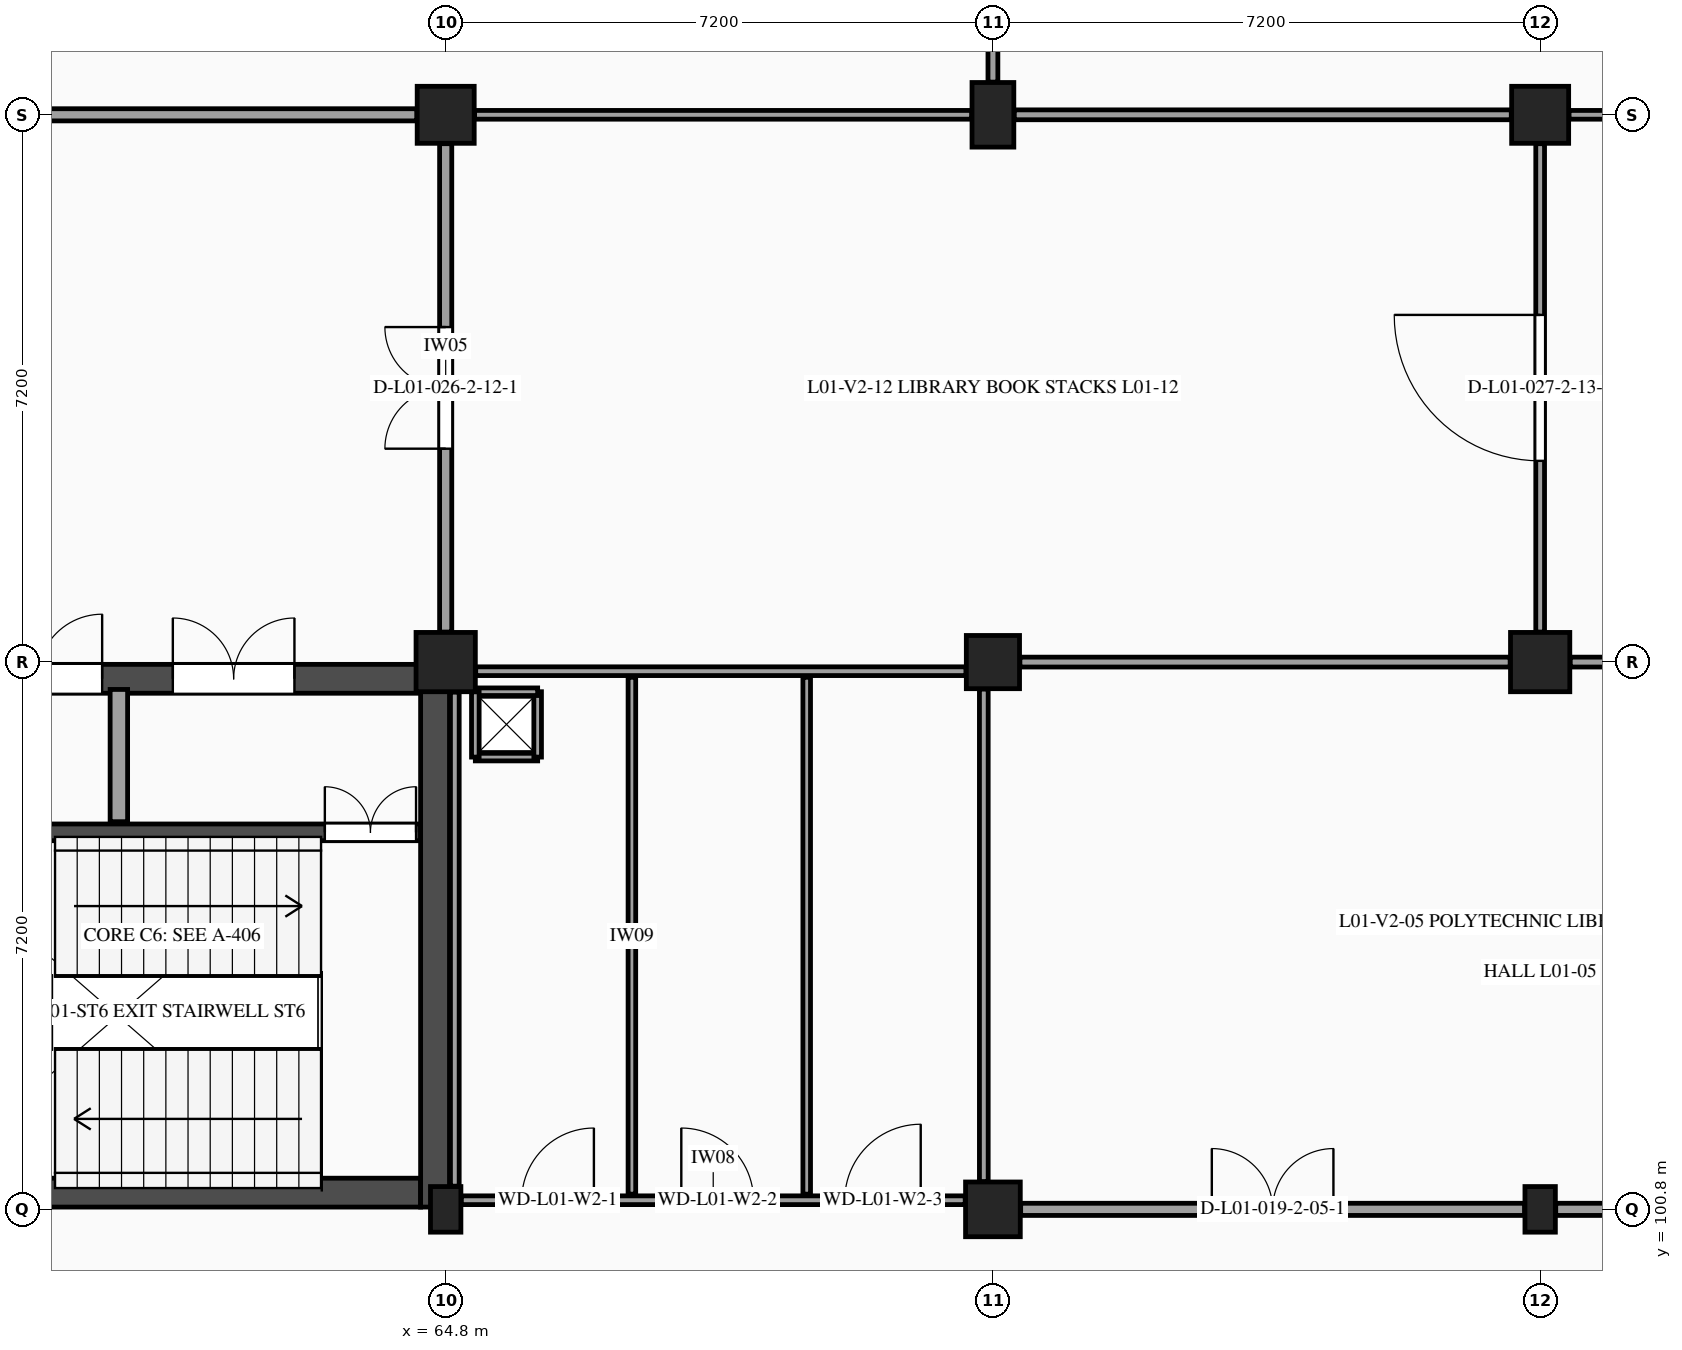
"""IFC4 building model, lengths in metres.
Left out: names, types, materials, properties, quantities, classifications, styles, units other than length and angle.
Written with IfcOpenShell. Run it as: python <this file> out.ifc"""

import sys

from ifc_helpers import new_model, si_unit, direction, frame, frame_2d, origin, origin_2d, place, context, subcontext, project, spatial, rectangle, extrude, element, fill, save


model = new_model("IFC4")
c1 = context("Model", 3, precision=1e-05, world=origin(), true_north=direction((0.0, 1.0)))
c2 = subcontext(c1, "Body", "Model", "MODEL_VIEW")
j1 = project(units=[si_unit("LENGTHUNIT", "METRE"), si_unit("PLANEANGLEUNIT", "RADIAN")], contexts=[c1])
p1 = place(None, origin())
s1 = spatial("IfcSite", under=j1, at=p1, CompositionType="ELEMENT")
p2 = place(p1, origin())
s2 = spatial("IfcBuilding", under=s1, at=p2, CompositionType="ELEMENT")
p3 = place(p2, frame((0.0, 0.0, 5.4)))
s3 = spatial("IfcBuildingStorey", under=s2, at=p3, CompositionType="ELEMENT", Elevation=5.4)
p4 = place(p3, frame((64.8, 100.8, 0.0), z_axis=(0.0, 0.0, 1.0), x_axis=(1.0, 0.0, 0.0)))
e1 = element("IfcColumn", 1, at=p4, inside=s3, PredefinedType="PILASTER", context=c2, shape_type="SweptSolid", body=[
    extrude(rectangle(XDim=0.4, YDim=0.6, at=origin_2d()), origin(), (0.0, 0.0, 1.0), 4.5),
])
p5 = place(p3, frame((64.8, 108.0, 0.0), z_axis=(0.0, 0.0, 1.0), x_axis=(1.0, 0.0, 0.0)))
e2 = element("IfcColumn", 2, at=p5, inside=s3, PredefinedType="COLUMN", context=c2, shape_type="SweptSolid", body=[
    extrude(rectangle(XDim=0.78, YDim=0.78, at=origin_2d()), origin(), (0.0, 0.0, 1.0), 4.5),
])
p6 = place(p3, frame((64.8, 115.2, 0.0), z_axis=(0.0, 0.0, 1.0), x_axis=(1.0, 0.0, 0.0)))
e3 = element("IfcColumn", 3, at=p6, inside=s3, PredefinedType="COLUMN", context=c2, shape_type="SweptSolid", body=[
    extrude(rectangle(XDim=0.75, YDim=0.75, at=origin_2d()), origin(), (0.0, 0.0, 1.0), 4.5),
])
p7 = place(p3, frame((72.0, 100.8, 0.0), z_axis=(0.0, 0.0, 1.0), x_axis=(1.0, 0.0, 0.0)))
e4 = element("IfcColumn", 4, at=p7, inside=s3, PredefinedType="COLUMN", context=c2, shape_type="SweptSolid", body=[
    extrude(rectangle(XDim=0.72, YDim=0.72, at=origin_2d()), origin(), (0.0, 0.0, 1.0), 4.5),
])
p8 = place(p3, frame((72.0, 108.0, 0.0), z_axis=(0.0, 0.0, 1.0), x_axis=(1.0, 0.0, 0.0)))
e5 = element("IfcColumn", 5, at=p8, inside=s3, PredefinedType="COLUMN", context=c2, shape_type="SweptSolid", body=[
    extrude(rectangle(XDim=0.7, YDim=0.7, at=origin_2d()), origin(), (0.0, 0.0, 1.0), 4.5),
])
p9 = place(p3, frame((72.0, 115.2, 0.0), z_axis=(0.0, 0.0, 1.0), x_axis=(1.0, 0.0, 0.0)))
e6 = element("IfcColumn", 6, at=p9, inside=s3, PredefinedType="COLUMN", context=c2, shape_type="SweptSolid", body=[
    extrude(rectangle(XDim=0.55, YDim=0.85, at=origin_2d()), origin(), (0.0, 0.0, 1.0), 4.5),
])
p10 = place(p3, frame((79.2, 100.8, 0.0), z_axis=(0.0, 0.0, 1.0), x_axis=(1.0, 0.0, 0.0)))
e7 = element("IfcColumn", 7, at=p10, inside=s3, PredefinedType="PILASTER", context=c2, shape_type="SweptSolid", body=[
    extrude(rectangle(XDim=0.4, YDim=0.6, at=origin_2d()), origin(), (0.0, 0.0, 1.0), 4.5),
])
p11 = place(p3, frame((79.2, 108.0, 0.0), z_axis=(0.0, 0.0, 1.0), x_axis=(1.0, 0.0, 0.0)))
e8 = element("IfcColumn", 8, at=p11, inside=s3, PredefinedType="COLUMN", context=c2, shape_type="SweptSolid", body=[
    extrude(rectangle(XDim=0.78, YDim=0.78, at=origin_2d()), origin(), (0.0, 0.0, 1.0), 4.5),
])
p12 = place(p3, frame((79.2, 115.2, 0.0), z_axis=(0.0, 0.0, 1.0), x_axis=(1.0, 0.0, 0.0)))
e9 = element("IfcColumn", 9, at=p12, inside=s3, PredefinedType="COLUMN", context=c2, shape_type="SweptSolid", body=[
    extrude(rectangle(XDim=0.75, YDim=0.75, at=origin_2d()), origin(), (0.0, 0.0, 1.0), 4.5),
])
p13 = place(p3, frame((58.01, 101.02, 0.0), z_axis=(0.0, 0.0, 1.0), x_axis=(1.0, 0.0, 0.0)))
e10 = element("IfcWall", 10, at=p13, inside=s3, PredefinedType="SHEAR", context=c2, shape_type="SweptSolid", body=[
    extrude(rectangle(XDim=6.46, YDim=0.38, at=frame_2d((3.23, 0.0))), origin(), (0.0, 0.0, 1.0), 4.21),
])
p14 = place(p3, frame((58.01, 107.78, 0.0), z_axis=(0.0, 0.0, 1.0), x_axis=(1.0, 0.0, 0.0)))
e11 = element("IfcWall", 11, at=p14, inside=s3, PredefinedType="SHEAR", context=c2, shape_type="SweptSolid", body=[
    extrude(rectangle(XDim=6.46, YDim=0.38, at=frame_2d((3.23, 0.0))), origin(), (0.0, 0.0, 1.0), 4.21),
])
p15 = place(p14, frame((1.42, 0.0, 0.0)))
e12 = element("IfcOpeningElement", 12, at=p15, cuts=e11, PredefinedType="OPENING", context=c2, shape_type="SweptSolid", body=[
    extrude(rectangle(XDim=0.85, YDim=2.1, at=frame_2d((0.425, 1.05))), frame((0.0, 0.2, 0.0), z_axis=(0.0, -1.0, 0.0), x_axis=(1.0, 0.0, 0.0)), (0.0, 0.0, 1.0), 0.4),
])
p16 = place(p14, frame((3.2, 0.0, 0.0)))
e13 = element("IfcOpeningElement", 13, at=p16, cuts=e11, PredefinedType="OPENING", context=c2, shape_type="SweptSolid", body=[
    extrude(rectangle(XDim=1.6, YDim=2.2, at=frame_2d((0.8, 1.1))), frame((0.0, 0.2, 0.0), z_axis=(0.0, -1.0, 0.0), x_axis=(1.0, 0.0, 0.0)), (0.0, 0.0, 1.0), 0.4),
])
p17 = place(p3, frame((58.01, 105.76, 0.0), z_axis=(0.0, 0.0, 1.0), x_axis=(1.0, 0.0, 0.0)))
e14 = element("IfcWall", 14, at=p17, inside=s3, PredefinedType="SHEAR", context=c2, shape_type="SweptSolid", body=[
    extrude(rectangle(XDim=6.46, YDim=0.22, at=frame_2d((3.23, 0.0))), origin(), (0.0, 0.0, 1.0), 4.21),
])
p18 = place(p17, frame((5.2, 0.0, 0.0)))
e15 = element("IfcOpeningElement", 15, at=p18, cuts=e14, PredefinedType="OPENING", context=c2, shape_type="SweptSolid", body=[
    extrude(rectangle(XDim=1.2, YDim=2.2, at=frame_2d((0.6, 1.1))), frame((0.0, 0.12, 0.0), z_axis=(0.0, -1.0, 0.0), x_axis=(1.0, 0.0, 0.0)), (0.0, 0.0, 1.0), 0.24),
])
p19 = place(p3, frame((60.5, 105.9, 0.0), z_axis=(0.0, 0.0, 1.0), x_axis=(0.0, 1.0, 0.0)))
e16 = element("IfcWall", 16, at=p19, inside=s3, PredefinedType="PARTITIONING", context=c2, shape_type="SweptSolid", body=[
    extrude(rectangle(XDim=1.74, YDim=0.23, at=frame_2d((0.87, 0.0))), origin(), (0.0, 0.0, 1.0), 4.21),
])
p20 = place(p3, frame((64.66, 100.83, 0.0), z_axis=(0.0, 0.0, 1.0), x_axis=(0.0, 1.0, 0.0)))
e17 = element("IfcWall", 17, at=p20, inside=s3, PredefinedType="SHEAR", context=c2, shape_type="SweptSolid", body=[
    extrude(rectangle(XDim=7.14, YDim=0.38, at=frame_2d((3.57, 0.0))), origin(), (0.0, 0.0, 1.0), 4.21),
])
p21 = place(p3, frame((65.005, 100.92, 0.0), z_axis=(0.0, 0.0, 1.0), x_axis=(1.0, 0.0, 0.0)))
e18 = element("IfcWall", 18, at=p21, inside=s3, PredefinedType="PARTITIONING", context=c2, shape_type="SweptSolid", body=[
    extrude(rectangle(XDim=6.63, YDim=0.115, at=frame_2d((3.315, 0.0))), origin(), (0.0, 0.0, 1.0), 3.43),
])
p22 = place(p21, frame((0.795, 0.0, 0.0)))
e19 = element("IfcOpeningElement", 19, at=p22, cuts=e18, PredefinedType="OPENING", context=c2, shape_type="SweptSolid", body=[
    extrude(rectangle(XDim=0.95, YDim=2.1, at=frame_2d((0.475, 1.05))), frame((0.0, 0.067, 0.0), z_axis=(0.0, -1.0, 0.0), x_axis=(1.0, 0.0, 0.0)), (0.0, 0.0, 1.0), 0.135),
])
p23 = place(p21, frame((2.895, 0.0, 0.0)))
e20 = element("IfcOpeningElement", 20, at=p23, cuts=e18, PredefinedType="OPENING", context=c2, shape_type="SweptSolid", body=[
    extrude(rectangle(XDim=0.95, YDim=2.1, at=frame_2d((0.475, 1.05))), frame((0.0, 0.067, 0.0), z_axis=(0.0, -1.0, 0.0), x_axis=(1.0, 0.0, 0.0)), (0.0, 0.0, 1.0), 0.135),
])
p24 = place(p21, frame((5.045, 0.0, 0.0)))
e21 = element("IfcOpeningElement", 21, at=p24, cuts=e18, PredefinedType="OPENING", context=c2, shape_type="SweptSolid", body=[
    extrude(rectangle(XDim=1.0, YDim=2.15, at=frame_2d((0.5, 1.075))), frame((0.0, 0.067, 0.0), z_axis=(0.0, -1.0, 0.0), x_axis=(1.0, 0.0, 0.0)), (0.0, 0.0, 1.0), 0.135),
])
p25 = place(p3, frame((65.195, 107.88, 0.0), z_axis=(0.0, 0.0, 1.0), x_axis=(1.0, 0.0, 0.0)))
e22 = element("IfcWall", 22, at=p25, inside=s3, PredefinedType="PARTITIONING", context=c2, shape_type="SweptSolid", body=[
    extrude(rectangle(XDim=6.45, YDim=0.115, at=frame_2d((3.225, 0.0))), origin(), (0.0, 0.0, 1.0), 3.43),
])
p26 = place(p3, frame((64.92, 101.105, 0.0), z_axis=(0.0, 0.0, 1.0), x_axis=(0.0, 1.0, 0.0)))
e23 = element("IfcWall", 23, at=p26, inside=s3, PredefinedType="PARTITIONING", context=c2, shape_type="SweptSolid", body=[
    extrude(rectangle(XDim=6.5, YDim=0.115, at=frame_2d((3.25, 0.0))), origin(), (0.0, 0.0, 1.0), 3.525),
])
p27 = place(p3, frame((71.88, 101.165, 0.0), z_axis=(0.0, 0.0, 1.0), x_axis=(0.0, 1.0, 0.0)))
e24 = element("IfcWall", 24, at=p27, inside=s3, PredefinedType="PARTITIONING", context=c2, shape_type="SweptSolid", body=[
    extrude(rectangle(XDim=6.48, YDim=0.115, at=frame_2d((3.24, 0.0))), origin(), (0.0, 0.0, 1.0), 3.525),
])
for number, where, z_axis, x_axis in (
    (25, (67.25, 101.0, 0.0), (0.0, 0.0, 1.0), (0.0, 1.0, 0.0)),
    (26, (69.55, 101.0, 0.0), (0.0, 0.0, 1.0), (0.0, 1.0, 0.0)),
):
    element("IfcWall", number, at=place(p3, frame(where, z_axis=z_axis, x_axis=x_axis)), inside=s3, PredefinedType="PARTITIONING", context=c2, shape_type="SweptSolid", body=[
        extrude(rectangle(XDim=6.8, YDim=0.1, at=frame_2d((3.4, 0.0))), origin(), (0.0, 0.0, 1.0), 4.21),
    ])
p28 = place(p3, frame((65.19, 106.75, 0.0), z_axis=(0.0, 0.0, 1.0), x_axis=(1.0, 0.0, 0.0)))
e27 = element("IfcWall", 27, at=p28, inside=s3, PredefinedType="PARTITIONING", context=c2, shape_type="SweptSolid", body=[
    extrude(rectangle(XDim=0.82, YDim=0.1, at=frame_2d((0.41, 0.0))), origin(), (0.0, 0.0, 1.0), 4.21),
])
p29 = place(p3, frame((66.01, 106.75, 0.0), z_axis=(0.0, 0.0, 1.0), x_axis=(0.0, 1.0, 0.0)))
e28 = element("IfcWall", 28, at=p29, inside=s3, PredefinedType="PARTITIONING", context=c2, shape_type="SweptSolid", body=[
    extrude(rectangle(XDim=0.86, YDim=0.1, at=frame_2d((0.43, 0.0))), origin(), (0.0, 0.0, 1.0), 4.21),
])
p30 = place(p3, frame((66.01, 107.61, 0.0), z_axis=(0.0, 0.0, 1.0), x_axis=(-1.0, 0.0, 0.0)))
e29 = element("IfcWall", 29, at=p30, inside=s3, PredefinedType="PARTITIONING", context=c2, shape_type="SweptSolid", body=[
    extrude(rectangle(XDim=0.82, YDim=0.1, at=frame_2d((0.41, 0.0))), origin(), (0.0, 0.0, 1.0), 4.21),
])
p31 = place(p3, frame((65.19, 107.61, 0.0), z_axis=(0.0, 0.0, 1.0), x_axis=(0.0, -1.0, 0.0)))
e30 = element("IfcWall", 30, at=p31, inside=s3, PredefinedType="PARTITIONING", context=c2, shape_type="SweptSolid", body=[
    extrude(rectangle(XDim=0.86, YDim=0.1, at=frame_2d((0.43, 0.0))), origin(), (0.0, 0.0, 1.0), 4.21),
])
p32 = place(p3, frame((64.8, 108.395, 0.0), z_axis=(0.0, 0.0, 1.0), x_axis=(0.0, 1.0, 0.0)))
e31 = element("IfcWall", 31, at=p32, inside=s3, PredefinedType="PARTITIONING", context=c2, shape_type="SweptSolid", body=[
    extrude(rectangle(XDim=6.425, YDim=0.16, at=frame_2d((3.212, 0.0))), origin(), (0.0, 0.0, 1.0), 3.525),
])
p33 = place(p32, frame((2.413, 0.0, 0.0)))
e32 = element("IfcOpeningElement", 32, at=p33, cuts=e31, PredefinedType="OPENING", context=c2, shape_type="SweptSolid", body=[
    extrude(rectangle(XDim=1.6, YDim=2.2, at=frame_2d((0.8, 1.1))), frame((0.0, 0.09, 0.0), z_axis=(0.0, -1.0, 0.0), x_axis=(1.0, 0.0, 0.0)), (0.0, 0.0, 1.0), 0.18),
])
p34 = place(p3, frame((57.88, 115.2, 0.0), z_axis=(0.0, 0.0, 1.0), x_axis=(1.0, 0.0, 0.0)))
e33 = element("IfcWall", 33, at=p34, inside=s3, PredefinedType="PARTITIONING", context=c2, shape_type="SweptSolid", body=[
    extrude(rectangle(XDim=6.54, YDim=0.16, at=frame_2d((3.27, 0.0))), origin(), (0.0, 0.0, 1.0), 3.41),
])
p35 = place(p3, frame((65.18, 115.2, 0.0), z_axis=(0.0, 0.0, 1.0), x_axis=(1.0, 0.0, 0.0)))
e34 = element("IfcWall", 34, at=p35, inside=s3, PredefinedType="PARTITIONING", context=c2, shape_type="SweptSolid", body=[
    extrude(rectangle(XDim=6.54, YDim=0.115, at=frame_2d((3.27, 0.0))), origin(), (0.0, 0.0, 1.0), 3.43),
])
p36 = place(p3, frame((72.0, 115.63, 0.0), z_axis=(0.0, 0.0, 1.0), x_axis=(0.0, 1.0, 0.0)))
e35 = element("IfcWall", 35, at=p36, inside=s3, PredefinedType="PARTITIONING", context=c2, shape_type="SweptSolid", body=[
    extrude(rectangle(XDim=6.465, YDim=0.13, at=frame_2d((3.232, 0.0))), origin(), (0.0, 0.0, 1.0), 3.52),
])
p37 = place(p36, frame((2.433, 0.0, 0.0)))
e36 = element("IfcOpeningElement", 36, at=p37, cuts=e35, PredefinedType="OPENING", context=c2, shape_type="SweptSolid", body=[
    extrude(rectangle(XDim=1.6, YDim=2.2, at=frame_2d((0.8, 1.1))), frame((0.0, 0.075, 0.0), z_axis=(0.0, -1.0, 0.0), x_axis=(1.0, 0.0, 0.0)), (0.0, 0.0, 1.0), 0.15),
])
p38 = place(p3, frame((72.365, 100.8, 0.0), z_axis=(0.0, 0.0, 1.0), x_axis=(1.0, 0.0, 0.0)))
e37 = element("IfcWall", 37, at=p38, inside=s3, PredefinedType="PARTITIONING", context=c2, shape_type="SweptSolid", body=[
    extrude(rectangle(XDim=6.63, YDim=0.16, at=frame_2d((3.315, 0.0))), origin(), (0.0, 0.0, 1.0), 3.46),
])
p39 = place(p38, frame((2.515, 0.0, 0.0)))
e38 = element("IfcOpeningElement", 38, at=p39, cuts=e37, PredefinedType="OPENING", context=c2, shape_type="SweptSolid", body=[
    extrude(rectangle(XDim=1.6, YDim=2.2, at=frame_2d((0.8, 1.1))), frame((0.0, 0.09, 0.0), z_axis=(0.0, -1.0, 0.0), x_axis=(1.0, 0.0, 0.0)), (0.0, 0.0, 1.0), 0.18),
])
p40 = place(p3, frame((72.355, 108.0, 0.0), z_axis=(0.0, 0.0, 1.0), x_axis=(1.0, 0.0, 0.0)))
e39 = element("IfcWall", 39, at=p40, inside=s3, PredefinedType="PARTITIONING", context=c2, shape_type="SweptSolid", body=[
    extrude(rectangle(XDim=6.45, YDim=0.13, at=frame_2d((3.225, 0.0))), origin(), (0.0, 0.0, 1.0), 3.46),
])
p41 = place(p3, frame((79.2, 108.395, 0.0), z_axis=(0.0, 0.0, 1.0), x_axis=(0.0, 1.0, 0.0)))
e40 = element("IfcWall", 40, at=p41, inside=s3, PredefinedType="PARTITIONING", context=c2, shape_type="SweptSolid", body=[
    extrude(rectangle(XDim=6.425, YDim=0.115, at=frame_2d((3.212, 0.0))), origin(), (0.0, 0.0, 1.0), 3.525),
])
p42 = place(p41, frame((2.252, 0.0, 0.0)))
e41 = element("IfcOpeningElement", 41, at=p42, cuts=e40, PredefinedType="OPENING", context=c2, shape_type="SweptSolid", body=[
    extrude(rectangle(XDim=1.92, YDim=2.35, at=frame_2d((0.96, 1.175))), frame((0.0, 0.067, 0.0), z_axis=(0.0, -1.0, 0.0), x_axis=(1.0, 0.0, 0.0)), (0.0, 0.0, 1.0), 0.135),
])
p43 = place(p3, frame((72.28, 115.2, 0.0), z_axis=(0.0, 0.0, 1.0), x_axis=(1.0, 0.0, 0.0)))
e42 = element("IfcWall", 42, at=p43, inside=s3, PredefinedType="PARTITIONING", context=c2, shape_type="SweptSolid", body=[
    extrude(rectangle(XDim=6.54, YDim=0.13, at=frame_2d((3.27, 0.0))), origin(), (0.0, 0.0, 1.0), 3.46),
])
p44 = place(p3, frame((79.405, 100.8, 0.0), z_axis=(0.0, 0.0, 1.0), x_axis=(1.0, 0.0, 0.0)))
e43 = element("IfcWall", 43, at=p44, inside=s3, PredefinedType="PARTITIONING", context=c2, shape_type="SweptSolid", body=[
    extrude(rectangle(XDim=6.63, YDim=0.16, at=frame_2d((3.315, 0.0))), origin(), (0.0, 0.0, 1.0), 3.47),
])
p45 = place(p3, frame((79.595, 108.0, 0.0), z_axis=(0.0, 0.0, 1.0), x_axis=(1.0, 0.0, 0.0)))
e44 = element("IfcWall", 44, at=p45, inside=s3, PredefinedType="PARTITIONING", context=c2, shape_type="SweptSolid", body=[
    extrude(rectangle(XDim=6.45, YDim=0.13, at=frame_2d((3.225, 0.0))), origin(), (0.0, 0.0, 1.0), 3.47),
])
p46 = place(p3, frame((79.58, 115.2, 0.0), z_axis=(0.0, 0.0, 1.0), x_axis=(1.0, 0.0, 0.0)))
e45 = element("IfcWall", 45, at=p46, inside=s3, PredefinedType="PARTITIONING", context=c2, shape_type="SweptSolid", body=[
    extrude(rectangle(XDim=6.54, YDim=0.115, at=frame_2d((3.27, 0.0))), origin(), (0.0, 0.0, 1.0), 3.47),
])
p47 = place(p15, origin())
e46 = element("IfcDoor", 46, at=p47, inside=s3, OperationType="SINGLE_SWING_RIGHT", PredefinedType="DOOR", context=c2, shape_type="SweptSolid", body=[
    extrude(rectangle(XDim=0.85, YDim=2.1, at=frame_2d((0.425, 1.05))), frame((0.0, 0.025, 0.0), z_axis=(0.0, -1.0, 0.0), x_axis=(1.0, 0.0, 0.0)), (0.0, 0.0, 1.0), 0.05),
])
fill(e12, e46)
p48 = place(p18, origin())
e47 = element("IfcDoor", 47, at=p48, inside=s3, OperationType="DOUBLE_DOOR_SINGLE_SWING", PredefinedType="DOOR", context=c2, shape_type="SweptSolid", body=[
    extrude(rectangle(XDim=1.2, YDim=2.2, at=frame_2d((0.6, 1.1))), frame((0.0, 0.025, 0.0), z_axis=(0.0, -1.0, 0.0), x_axis=(1.0, 0.0, 0.0)), (0.0, 0.0, 1.0), 0.05),
])
fill(e15, e47)
p49 = place(p16, frame((1.6, 0.0, 0.0), z_axis=(0.0, 0.0, 1.0), x_axis=(-1.0, 0.0, 0.0)))
e48 = element("IfcDoor", 48, at=p49, inside=s3, OperationType="DOUBLE_DOOR_SINGLE_SWING", PredefinedType="DOOR", context=c2, shape_type="SweptSolid", body=[
    extrude(rectangle(XDim=1.6, YDim=2.2, at=frame_2d((0.8, 1.1))), frame((0.0, 0.025, 0.0), z_axis=(0.0, -1.0, 0.0), x_axis=(1.0, 0.0, 0.0)), (0.0, 0.0, 1.0), 0.05),
])
fill(e13, e48)
p50 = place(p22, origin())
e49 = element("IfcDoor", 49, at=p50, inside=s3, OperationType="SINGLE_SWING_RIGHT", PredefinedType="DOOR", context=c2, shape_type="SweptSolid", body=[
    extrude(rectangle(XDim=0.95, YDim=2.1, at=frame_2d((0.475, 1.05))), frame((0.0, 0.025, 0.0), z_axis=(0.0, -1.0, 0.0), x_axis=(1.0, 0.0, 0.0)), (0.0, 0.0, 1.0), 0.05),
])
fill(e19, e49)
p51 = place(p23, origin())
e50 = element("IfcDoor", 50, at=p51, inside=s3, OperationType="SINGLE_SWING_LEFT", PredefinedType="DOOR", context=c2, shape_type="SweptSolid", body=[
    extrude(rectangle(XDim=0.95, YDim=2.1, at=frame_2d((0.475, 1.05))), frame((0.0, 0.025, 0.0), z_axis=(0.0, -1.0, 0.0), x_axis=(1.0, 0.0, 0.0)), (0.0, 0.0, 1.0), 0.05),
])
fill(e20, e50)
p52 = place(p24, origin())
e51 = element("IfcDoor", 51, at=p52, inside=s3, OperationType="SINGLE_SWING_RIGHT", PredefinedType="DOOR", context=c2, shape_type="SweptSolid", body=[
    extrude(rectangle(XDim=1.0, YDim=2.15, at=frame_2d((0.5, 1.075))), frame((0.0, 0.025, 0.0), z_axis=(0.0, -1.0, 0.0), x_axis=(1.0, 0.0, 0.0)), (0.0, 0.0, 1.0), 0.05),
])
fill(e21, e51)
p53 = place(p39, origin())
e52 = element("IfcDoor", 52, at=p53, inside=s3, OperationType="DOUBLE_DOOR_SINGLE_SWING", PredefinedType="DOOR", context=c2, shape_type="SweptSolid", body=[
    extrude(rectangle(XDim=1.6, YDim=2.2, at=frame_2d((0.8, 1.1))), frame((0.0, 0.025, 0.0), z_axis=(0.0, -1.0, 0.0), x_axis=(1.0, 0.0, 0.0)), (0.0, 0.0, 1.0), 0.05),
])
fill(e38, e52)
p54 = place(p33, origin())
e53 = element("IfcDoor", 53, at=p54, inside=s3, OperationType="DOUBLE_DOOR_SINGLE_SWING", PredefinedType="DOOR", context=c2, shape_type="SweptSolid", body=[
    extrude(rectangle(XDim=1.6, YDim=2.2, at=frame_2d((0.8, 1.1))), frame((0.0, 0.025, 0.0), z_axis=(0.0, -1.0, 0.0), x_axis=(1.0, 0.0, 0.0)), (0.0, 0.0, 1.0), 0.05),
])
fill(e32, e53)
p55 = place(p42, origin())
e54 = element("IfcDoor", 54, at=p55, inside=s3, OperationType="SINGLE_SWING_RIGHT", PredefinedType="DOOR", context=c2, shape_type="SweptSolid", body=[
    extrude(rectangle(XDim=1.92, YDim=2.35, at=frame_2d((0.96, 1.175))), frame((0.0, 0.025, 0.0), z_axis=(0.0, -1.0, 0.0), x_axis=(1.0, 0.0, 0.0)), (0.0, 0.0, 1.0), 0.05),
])
fill(e41, e54)
save(model, sys.argv[1])
